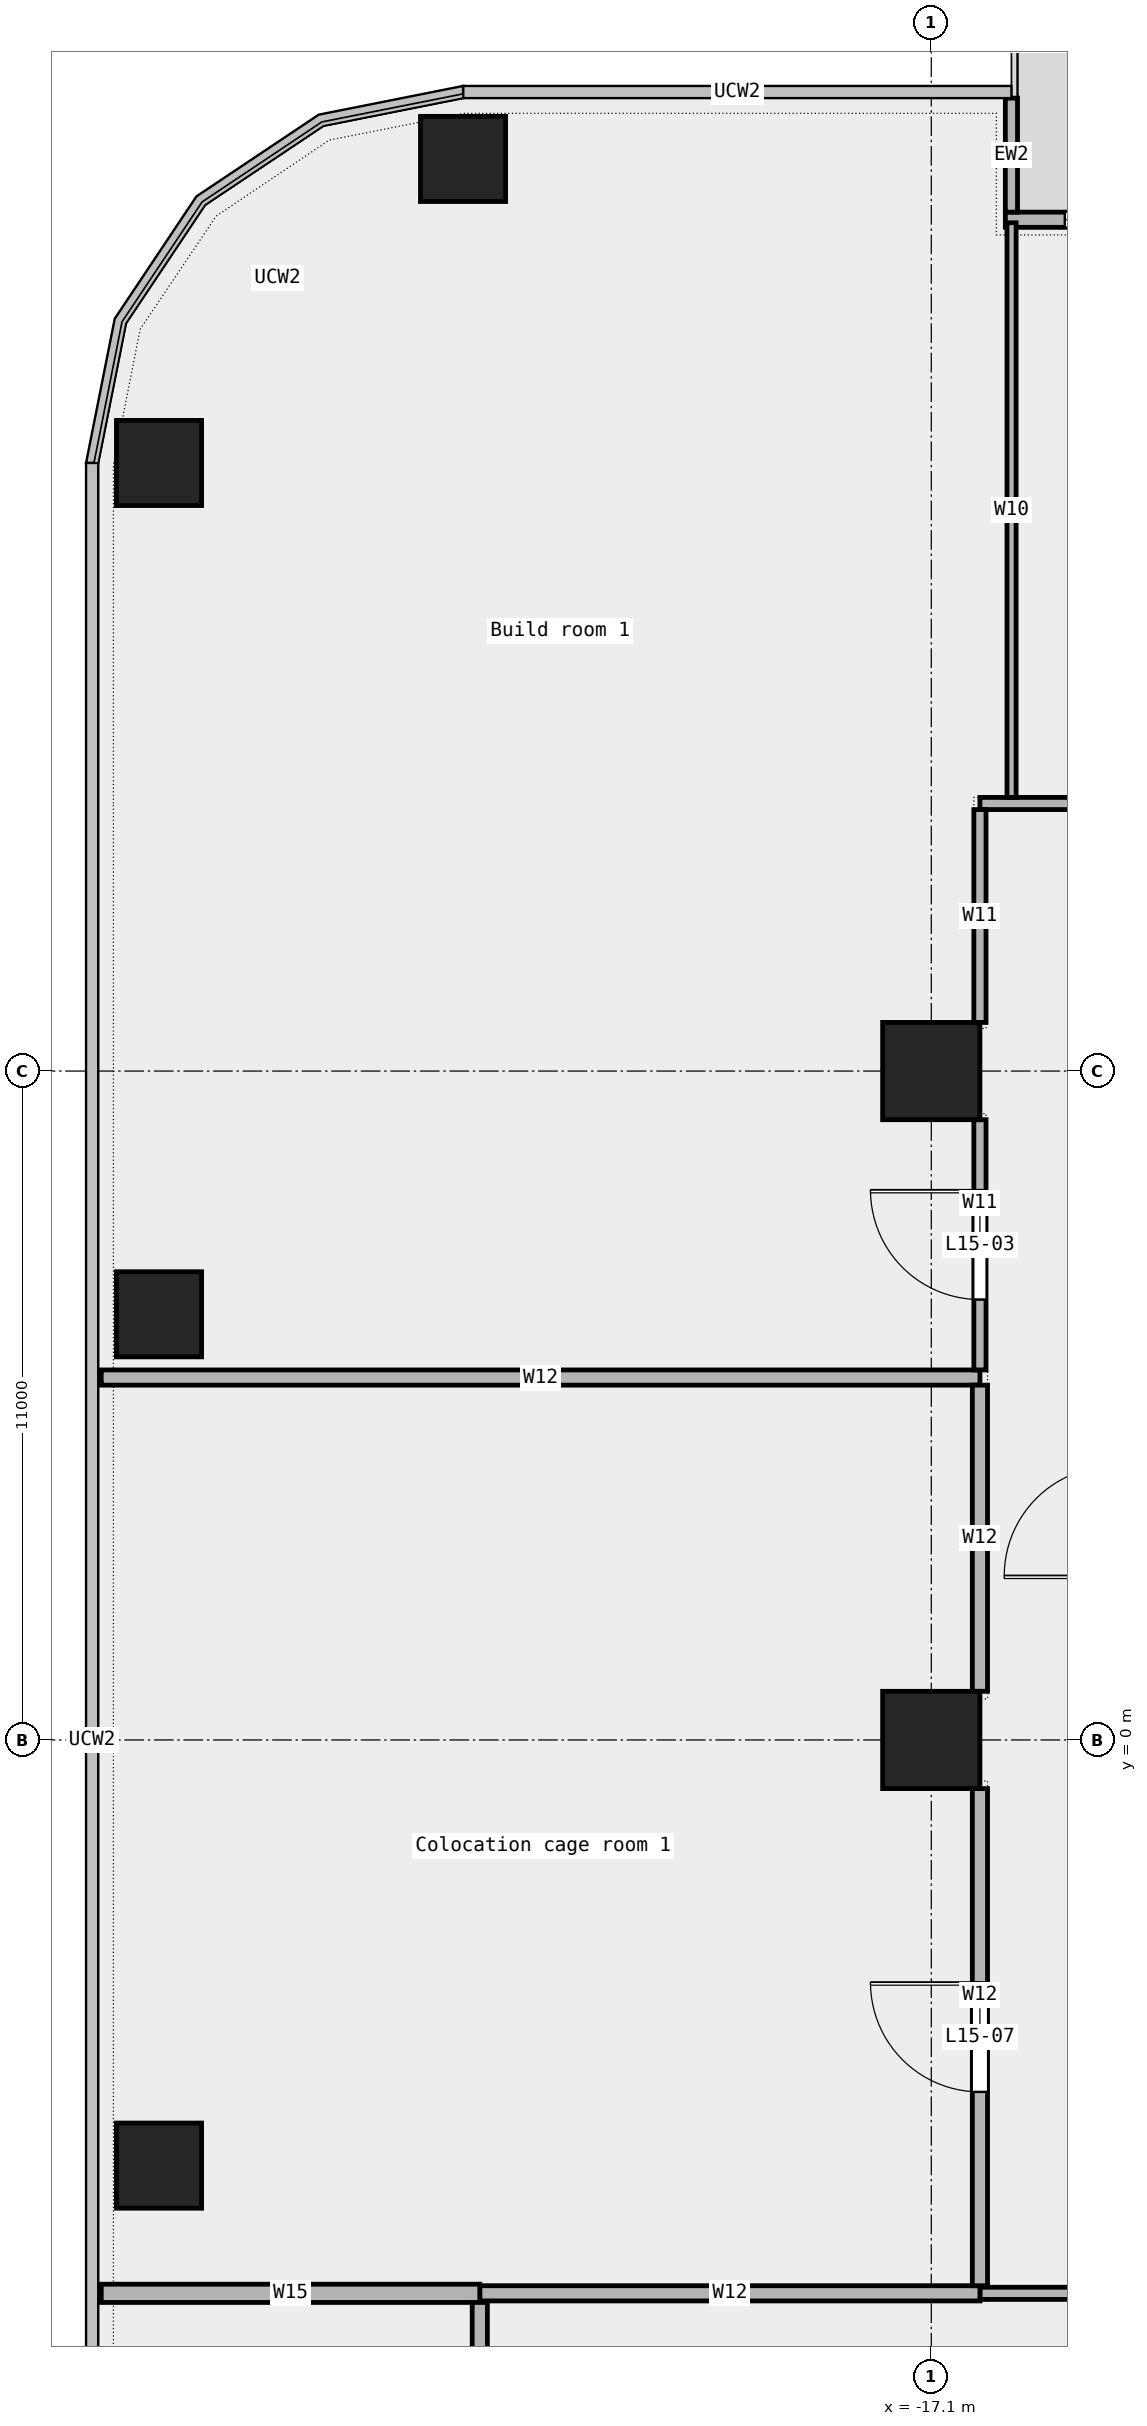
"""IFC4 building model, lengths in metres.
Left out: names, types, materials, properties, quantities, classifications, styles, units other than length and angle.
Written with IfcOpenShell. Run it as: python <this file> out.ifc"""

import sys

from ifc_helpers import new_model, si_unit, direction, frame, frame_2d, origin, origin_2d, place, context, subcontext, project, spatial, rectangle, extrude, element, fill, save


model = new_model("IFC4")
c1 = context("Model", 3, precision=1e-05, world=origin(), true_north=direction((0.0, 1.0)))
c2 = subcontext(c1, "Body", "Model", "MODEL_VIEW")
j1 = project(units=[si_unit("LENGTHUNIT", "METRE"), si_unit("PLANEANGLEUNIT", "RADIAN")], contexts=[c1])
p1 = place(None, origin())
s1 = spatial("IfcSite", under=j1, at=p1, CompositionType="ELEMENT")
p2 = place(p1, origin())
s2 = spatial("IfcBuilding", under=s1, at=p2, CompositionType="ELEMENT")
p3 = place(p2, frame((0.0, 0.0, 79.0)))
s3 = spatial("IfcBuildingStorey", under=s2, at=p3, CompositionType="ELEMENT", Elevation=79.0)
for number, where, z_axis, x_axis in (
    (1, (-24.8, 26.0, 0.0), (0.0, 0.0, 1.0), (1.0, 0.0, 0.0)),
    (2, (-29.8, 21.0, 0.0), (0.0, 0.0, 1.0), (1.0, 0.0, 0.0)),
    (3, (-29.8, 7.0, 0.0), (0.0, 0.0, 1.0), (1.0, 0.0, 0.0)),
    (4, (-29.8, -7.0, 0.0), (0.0, 0.0, 1.0), (1.0, 0.0, 0.0)),
):
    element("IfcColumn", number, at=place(p3, frame(where, z_axis=z_axis, x_axis=x_axis)), inside=s3, PredefinedType="COLUMN", context=c2, shape_type="SweptSolid", body=[
        extrude(rectangle(XDim=1.4, YDim=1.4, at=origin_2d()), origin(), (0.0, 0.0, 1.0), 4.35),
    ])
for number, where, z_axis, x_axis in (
    (5, (-17.1, 0.0, 0.0), (0.0, 0.0, 1.0), (1.0, 0.0, 0.0)),
    (6, (-17.1, 11.0, 0.0), (0.0, 0.0, 1.0), (1.0, 0.0, 0.0)),
):
    element("IfcColumn", number, at=place(p3, frame(where, z_axis=z_axis, x_axis=x_axis)), inside=s3, PredefinedType="COLUMN", context=c2, shape_type="SweptSolid", body=[
        extrude(rectangle(XDim=1.6, YDim=1.6, at=origin_2d()), origin(), (0.0, 0.0, 1.0), 4.35),
    ])
p4 = place(p3, frame((-2.155, 25.0, 0.0), z_axis=(0.0, 0.0, 1.0), x_axis=(-1.0, 0.0, 0.0)))
e7 = element("IfcWall", 7, at=p4, inside=s3, PredefinedType="STANDARD", context=c2, shape_type="SweptSolid", body=[
    extrude(rectangle(XDim=13.727, YDim=0.25, at=frame_2d((6.864, 0.0))), origin(), (0.0, 0.0, 1.0), 4.35),
])
p5 = place(p4, frame((1.75, 0.0, 0.45)))
e8 = element("IfcOpeningElement", 8, at=p5, cuts=e7, PredefinedType="OPENING", context=c2, shape_type="SweptSolid", body=[
    extrude(rectangle(XDim=1.5, YDim=3.0, at=frame_2d((0.75, 1.5))), frame((0.0, 0.137, 0.0), z_axis=(0.0, -1.0, 0.0), x_axis=(1.0, 0.0, 0.0)), (0.0, 0.0, 1.0), 0.274),
])
p6 = place(p4, frame((6.0, 0.0, 0.0)))
e9 = element("IfcOpeningElement", 9, at=p6, cuts=e7, PredefinedType="OPENING", context=c2, shape_type="SweptSolid", body=[
    extrude(rectangle(XDim=1.8, YDim=2.4, at=frame_2d((0.9, 1.2))), frame((0.0, 0.137, 0.0), z_axis=(0.0, -1.0, 0.0), x_axis=(1.0, 0.0, 0.0)), (0.0, 0.0, 1.0), 0.274),
])
p7 = place(p4, frame((11.25, 0.0, 0.45)))
e10 = element("IfcOpeningElement", 10, at=p7, cuts=e7, PredefinedType="OPENING", context=c2, shape_type="SweptSolid", body=[
    extrude(rectangle(XDim=1.5, YDim=3.0, at=frame_2d((0.75, 1.5))), frame((0.0, 0.137, 0.0), z_axis=(0.0, -1.0, 0.0), x_axis=(1.0, 0.0, 0.0)), (0.0, 0.0, 1.0), 0.274),
])
p8 = place(p3, frame((-15.782, 27.0, 0.0), z_axis=(0.0, 0.0, 1.0), x_axis=(0.0, -1.0, 0.0)))
e11 = element("IfcWall", 11, at=p8, inside=s3, PredefinedType="STANDARD", context=c2, shape_type="SweptSolid", body=[
    extrude(rectangle(XDim=1.875, YDim=0.2, at=frame_2d((0.938, 0.0))), origin(), (0.0, 0.0, 1.0), 4.35),
])
p9 = place(p3, frame((-16.3, -9.1, 0.0), z_axis=(0.0, 0.0, 1.0), x_axis=(1.0, 0.0, 0.0)))
e12 = element("IfcWall", 12, at=p9, inside=s3, PredefinedType="PARTITIONING", context=c2, shape_type="SweptSolid", body=[
    extrude(rectangle(XDim=6.845, YDim=0.2, at=frame_2d((3.422, 0.0))), origin(), (0.0, 0.0, 1.0), 4.35),
])
p10 = place(p3, frame((-24.525, -9.1, 0.0), z_axis=(0.0, 0.0, 1.0), x_axis=(1.0, 0.0, 0.0)))
e13 = element("IfcWall", 13, at=p10, inside=s3, PredefinedType="PARTITIONING", context=c2, shape_type="SweptSolid", body=[
    extrude(rectangle(XDim=8.225, YDim=0.25, at=frame_2d((4.112, 0.0))), origin(), (0.0, 0.0, 1.0), 4.35),
])
p11 = place(p3, frame((-30.75, -9.1, 0.0), z_axis=(0.0, 0.0, 1.0), x_axis=(1.0, 0.0, 0.0)))
e14 = element("IfcWall", 14, at=p11, inside=s3, PredefinedType="PARTITIONING", context=c2, shape_type="SweptSolid", body=[
    extrude(rectangle(XDim=6.225, YDim=0.3, at=frame_2d((3.113, 0.0))), origin(), (0.0, 0.0, 1.0), 4.35),
])
p12 = place(p3, frame((-30.75, 5.96, 0.0), z_axis=(0.0, 0.0, 1.0), x_axis=(1.0, 0.0, 0.0)))
e15 = element("IfcWall", 15, at=p12, inside=s3, PredefinedType="PARTITIONING", context=c2, shape_type="SweptSolid", body=[
    extrude(rectangle(XDim=14.45, YDim=0.25, at=frame_2d((7.225, 0.0))), origin(), (0.0, 0.0, 1.0), 4.35),
])
p13 = place(p3, frame((-16.3, 15.4, 0.0), z_axis=(0.0, 0.0, 1.0), x_axis=(1.0, 0.0, 0.0)))
e16 = element("IfcWall", 16, at=p13, inside=s3, PredefinedType="PARTITIONING", context=c2, shape_type="SweptSolid", body=[
    extrude(rectangle(XDim=14.045, YDim=0.2, at=frame_2d((7.022, 0.0))), origin(), (0.0, 0.0, 1.0), 4.35),
])
p14 = place(p13, frame((6.532, 0.0, 0.0)))
e17 = element("IfcOpeningElement", 17, at=p14, cuts=e16, PredefinedType="OPENING", context=c2, shape_type="SweptSolid", body=[
    extrude(rectangle(XDim=1.5, YDim=2.1, at=frame_2d((0.75, 1.05))), frame((0.0, 0.112, 0.0), z_axis=(0.0, -1.0, 0.0), x_axis=(1.0, 0.0, 0.0)), (0.0, 0.0, 1.0), 0.224),
])
p15 = place(p3, frame((-24.525, -15.325, 0.0), z_axis=(0.0, 0.0, 1.0), x_axis=(0.0, 1.0, 0.0)))
e18 = element("IfcWall", 18, at=p15, inside=s3, PredefinedType="PARTITIONING", context=c2, shape_type="SweptSolid", body=[
    extrude(rectangle(XDim=6.075, YDim=0.25, at=frame_2d((3.038, 0.0))), origin(), (0.0, 0.0, 1.0), 4.35),
])
p16 = place(p3, frame((-16.3, 6.085, 0.0), z_axis=(0.0, 0.0, 1.0), x_axis=(0.0, 1.0, 0.0)))
e19 = element("IfcWall", 19, at=p16, inside=s3, PredefinedType="PARTITIONING", context=c2, shape_type="SweptSolid", body=[
    extrude(rectangle(XDim=4.115, YDim=0.2, at=frame_2d((2.058, 0.0))), origin(), (0.0, 0.0, 1.0), 4.35),
])
p17 = place(p16, frame((1.157, 0.0, 0.0)))
e20 = element("IfcOpeningElement", 20, at=p17, cuts=e19, PredefinedType="OPENING", context=c2, shape_type="SweptSolid", body=[
    extrude(rectangle(XDim=1.8, YDim=2.1, at=frame_2d((0.9, 1.05))), frame((0.0, 0.112, 0.0), z_axis=(0.0, -1.0, 0.0), x_axis=(1.0, 0.0, 0.0)), (0.0, 0.0, 1.0), 0.224),
])
p18 = place(p3, frame((-16.3, 11.8, 0.0), z_axis=(0.0, 0.0, 1.0), x_axis=(0.0, 1.0, 0.0)))
e21 = element("IfcWall", 21, at=p18, inside=s3, PredefinedType="PARTITIONING", context=c2, shape_type="SweptSolid", body=[
    extrude(rectangle(XDim=3.5, YDim=0.2, at=frame_2d((1.75, 0.0))), origin(), (0.0, 0.0, 1.0), 4.35),
])
p19 = place(p3, frame((-16.3, -8.975, 0.0), z_axis=(0.0, 0.0, 1.0), x_axis=(0.0, 1.0, 0.0)))
e22 = element("IfcWall", 22, at=p19, inside=s3, PredefinedType="PARTITIONING", context=c2, shape_type="SweptSolid", body=[
    extrude(rectangle(XDim=8.175, YDim=0.25, at=frame_2d((4.087, 0.0))), origin(), (0.0, 0.0, 1.0), 4.35),
])
p20 = place(p19, frame((3.188, 0.0, 0.0)))
e23 = element("IfcOpeningElement", 23, at=p20, cuts=e22, PredefinedType="OPENING", context=c2, shape_type="SweptSolid", body=[
    extrude(rectangle(XDim=1.8, YDim=2.1, at=frame_2d((0.9, 1.05))), frame((0.0, 0.137, 0.0), z_axis=(0.0, -1.0, 0.0), x_axis=(1.0, 0.0, 0.0)), (0.0, 0.0, 1.0), 0.274),
])
p21 = place(p3, frame((-16.3, 0.8, 0.0), z_axis=(0.0, 0.0, 1.0), x_axis=(0.0, 1.0, 0.0)))
e24 = element("IfcWall", 24, at=p21, inside=s3, PredefinedType="PARTITIONING", context=c2, shape_type="SweptSolid", body=[
    extrude(rectangle(XDim=5.035, YDim=0.25, at=frame_2d((2.518, 0.0))), origin(), (0.0, 0.0, 1.0), 4.35),
])
p22 = place(p3, frame((-15.78, 15.5, 0.0), z_axis=(0.0, 0.0, 1.0), x_axis=(0.0, 1.0, 0.0)))
e25 = element("IfcWall", 25, at=p22, inside=s3, PredefinedType="PARTITIONING", context=c2, shape_type="SweptSolid", body=[
    extrude(rectangle(XDim=9.45, YDim=0.15, at=frame_2d((4.725, 0.0))), origin(), (0.0, 0.0, 1.0), 4.35),
])
p23 = place(p7, origin())
e26 = element("IfcWindow", 26, at=p23, inside=s3, PartitioningType="SINGLE_PANEL", PredefinedType="WINDOW", context=c2, shape_type="SweptSolid", body=[
    extrude(rectangle(XDim=1.5, YDim=3.0, at=frame_2d((0.75, 1.5))), frame((0.0, 0.03, 0.0), z_axis=(0.0, -1.0, 0.0), x_axis=(1.0, 0.0, 0.0)), (0.0, 0.0, 1.0), 0.06),
])
fill(e10, e26)
p24 = place(p17, origin())
e27 = element("IfcDoor", 27, at=p24, inside=s3, OperationType="DOUBLE_DOOR_SINGLE_SWING", PredefinedType="DOOR", context=c2, shape_type="SweptSolid", body=[
    extrude(rectangle(XDim=1.8, YDim=2.1, at=frame_2d((0.9, 1.05))), frame((0.0, 0.025, 0.0), z_axis=(0.0, -1.0, 0.0), x_axis=(1.0, 0.0, 0.0)), (0.0, 0.0, 1.0), 0.05),
])
fill(e20, e27)
p25 = place(p20, origin())
e28 = element("IfcDoor", 28, at=p25, inside=s3, OperationType="DOUBLE_DOOR_SINGLE_SWING", PredefinedType="DOOR", context=c2, shape_type="SweptSolid", body=[
    extrude(rectangle(XDim=1.8, YDim=2.1, at=frame_2d((0.9, 1.05))), frame((0.0, 0.025, 0.0), z_axis=(0.0, -1.0, 0.0), x_axis=(1.0, 0.0, 0.0)), (0.0, 0.0, 1.0), 0.05),
])
fill(e23, e28)
save(model, sys.argv[1])
